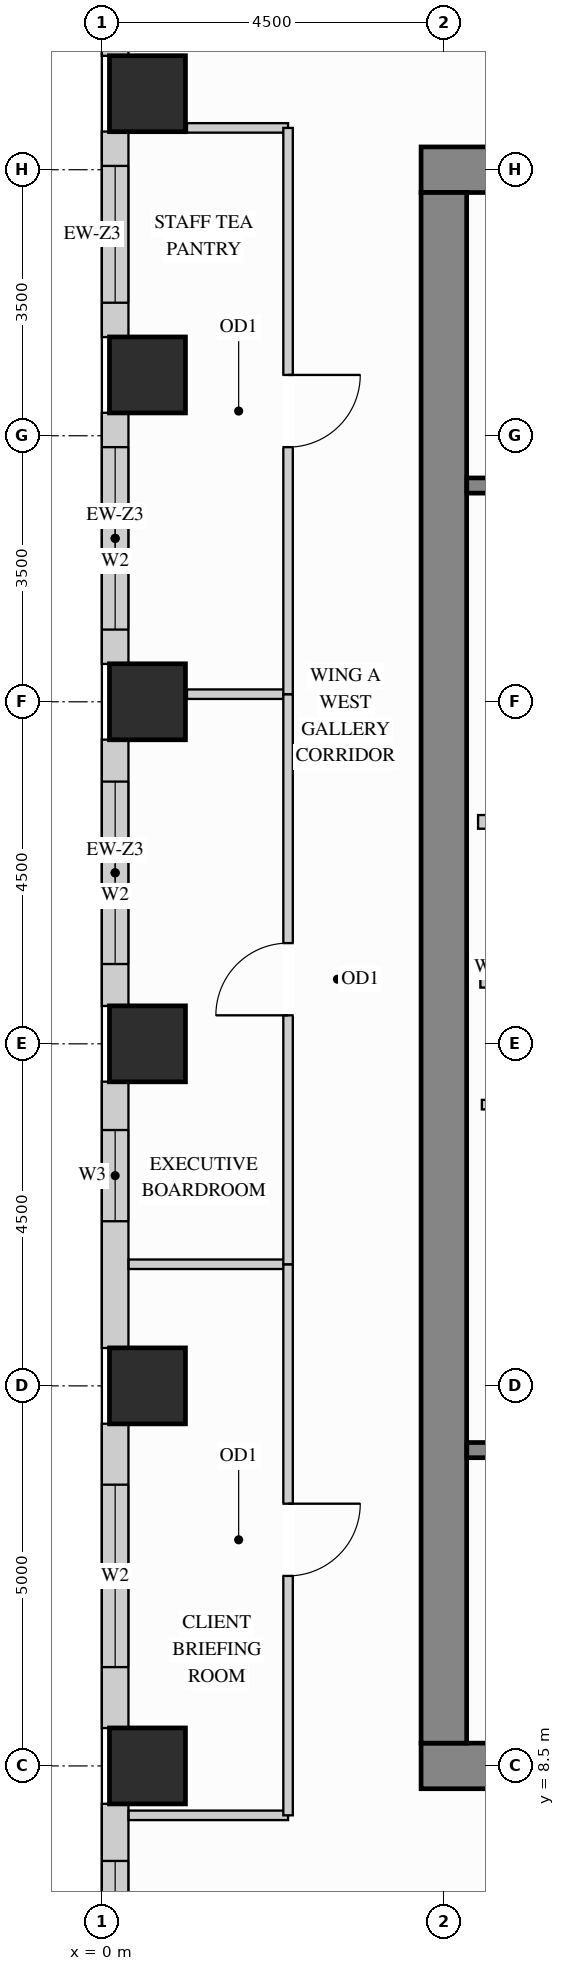
"""IFC4 building model, lengths in metres.
Left out: names, types, materials, properties, quantities, classifications, styles, units other than length and angle.
Written with IfcOpenShell. Run it as: python <this file> out.ifc"""

import sys

from ifc_helpers import new_model, si_unit, direction, frame, frame_2d, origin, origin_2d, place, context, subcontext, project, spatial, rectangle, extrude, source, transform, mapped, element, fill, save


model = new_model("IFC4")
c1 = context("Model", 3, precision=1e-05, world=origin(), true_north=direction((0.0, 1.0)))
c2 = subcontext(c1, "Body", "Model", "MODEL_VIEW")
j1 = project(units=[si_unit("LENGTHUNIT", "METRE"), si_unit("PLANEANGLEUNIT", "RADIAN")], contexts=[c1])
p1 = place(None, origin())
s1 = spatial("IfcSite", under=j1, at=p1, CompositionType="ELEMENT")
p2 = place(p1, origin())
s2 = spatial("IfcBuilding", under=s1, at=p2, CompositionType="ELEMENT")
p3 = place(p2, frame((0.0, 0.0, 197.1)))
s3 = spatial("IfcBuildingStorey", under=s2, at=p3, CompositionType="ELEMENT", Elevation=197.1)
m1 = source(origin(), c2, "Body", "SweptSolid", [
    extrude(rectangle(XDim=1.0, YDim=1.0, at=origin_2d()), origin(), (0.0, 0.0, 1.0), 3.4),
])
for number, where, z_axis, x_axis in (
    (1, (0.6, 13.5, 0.0), (0.0, 0.0, 1.0), (1.0, 0.0, 0.0)),
    (2, (0.6, 18.0, 0.0), (0.0, 0.0, 1.0), (1.0, 0.0, 0.0)),
    (3, (0.6, 22.5, 0.0), (0.0, 0.0, 1.0), (1.0, 0.0, 0.0)),
    (4, (0.6, 26.8, 0.0), (0.0, 0.0, 1.0), (1.0, 0.0, 0.0)),
    (5, (0.6, 30.5, 0.0), (0.0, 0.0, 1.0), (1.0, 0.0, 0.0)),
    (6, (0.6, 8.5, 0.0), (0.0, 0.0, 1.0), (1.0, 0.0, 0.0)),
):
    element("IfcColumn", number, at=place(p3, frame(where, z_axis=z_axis, x_axis=x_axis)), inside=s3, PredefinedType="COLUMN", context=c2, shape_type="MappedRepresentation", body=[
        mapped(m1, transform((0.0, 0.0, 0.0), x_axis=(1.0, 0.0, 0.0), y_axis=(0.0, 1.0, 0.0), z_axis=(0.0, 0.0, 1.0))),
    ])
m2 = source(origin(), c2, "Body", "SweptSolid", [
    extrude(rectangle(XDim=10.6, YDim=0.6, at=frame_2d((5.3, 0.0))), origin(), (0.0, 0.0, 1.0), 3.4),
])
for number, where, z_axis, x_axis in (
    (7, (4.2, 29.5, 0.0), (0.0, 0.0, 1.0), (1.0, 0.0, 0.0)),
    (8, (4.2, 8.5, 0.0), (0.0, 0.0, 1.0), (1.0, 0.0, 0.0)),
):
    element("IfcWall", number, at=place(p3, frame(where, z_axis=z_axis, x_axis=x_axis)), inside=s3, PredefinedType="SHEAR", context=c2, shape_type="MappedRepresentation", body=[
        mapped(m2, transform((0.0, 0.0, 0.0), x_axis=(1.0, 0.0, 0.0), y_axis=(0.0, 1.0, 0.0), z_axis=(0.0, 0.0, 1.0))),
    ])
m3 = source(origin(), c2, "Body", "SweptSolid", [
    extrude(rectangle(XDim=20.4, YDim=0.6, at=frame_2d((10.2, 0.0))), origin(), (0.0, 0.0, 1.0), 3.4),
])
p4 = place(p3, frame((4.5, 8.8, 0.0), z_axis=(0.0, 0.0, 1.0), x_axis=(0.0, 1.0, 0.0)))
e9 = element("IfcWall", 9, at=p4, inside=s3, PredefinedType="SHEAR", context=c2, shape_type="MappedRepresentation", body=[
    mapped(m3, transform((0.0, 0.0, 0.0), x_axis=(1.0, 0.0, 0.0), y_axis=(0.0, 1.0, 0.0), z_axis=(0.0, 0.0, 1.0))),
])
p5 = place(p3, frame((0.175, 34.502, 0.0), z_axis=(0.0, 0.0, 1.0), x_axis=(0.0, -1.0, 0.0)))
e10 = element("IfcWall", 10, at=p5, inside=s3, PredefinedType="SOLIDWALL", context=c2, shape_type="SweptSolid", body=[
    extrude(rectangle(XDim=3.504, YDim=0.35, at=frame_2d((1.752, 0.0))), origin(), (0.0, 0.0, 1.0), 2.612),
])
p6 = place(p5, frame((0.511, 0.0, 0.78)))
e11 = element("IfcOpeningElement", 11, at=p6, cuts=e10, PredefinedType="OPENING", context=c2, shape_type="SweptSolid", body=[
    extrude(rectangle(XDim=1.2, YDim=1.652, at=frame_2d((0.6, 0.826))), frame((0.0, 0.185, 0.0), z_axis=(0.0, -1.0, 0.0), x_axis=(1.0, 0.0, 0.0)), (0.0, 0.0, 1.0), 0.37),
])
p7 = place(p3, frame((0.175, 30.002, 0.0), z_axis=(0.0, 0.0, 1.0), x_axis=(0.0, -1.0, 0.0)))
e12 = element("IfcWall", 12, at=p7, inside=s3, PredefinedType="SOLIDWALL", context=c2, shape_type="SweptSolid", body=[
    extrude(rectangle(XDim=2.704, YDim=0.35, at=frame_2d((1.352, 0.0))), origin(), (0.0, 0.0, 1.0), 2.612),
])
p8 = place(p7, frame((0.452, 0.0, 0.78)))
e13 = element("IfcOpeningElement", 13, at=p8, cuts=e12, PredefinedType="OPENING", context=c2, shape_type="SweptSolid", body=[
    extrude(rectangle(XDim=1.8, YDim=1.652, at=frame_2d((0.9, 0.826))), frame((0.0, 0.185, 0.0), z_axis=(0.0, -1.0, 0.0), x_axis=(1.0, 0.0, 0.0)), (0.0, 0.0, 1.0), 0.37),
])
p9 = place(p3, frame((0.175, 26.302, 0.0), z_axis=(0.0, 0.0, 1.0), x_axis=(0.0, -1.0, 0.0)))
e14 = element("IfcWall", 14, at=p9, inside=s3, PredefinedType="SOLIDWALL", context=c2, shape_type="SweptSolid", body=[
    extrude(rectangle(XDim=3.304, YDim=0.35, at=frame_2d((1.652, 0.0))), origin(), (0.0, 0.0, 1.0), 2.612),
])
p10 = place(p9, frame((0.452, 0.0, 0.78)))
e15 = element("IfcOpeningElement", 15, at=p10, cuts=e14, PredefinedType="OPENING", context=c2, shape_type="SweptSolid", body=[
    extrude(rectangle(XDim=2.4, YDim=1.652, at=frame_2d((1.2, 0.826))), frame((0.0, 0.185, 0.0), z_axis=(0.0, -1.0, 0.0), x_axis=(1.0, 0.0, 0.0)), (0.0, 0.0, 1.0), 0.37),
])
p11 = place(p3, frame((0.175, 22.002, 0.0), z_axis=(0.0, 0.0, 1.0), x_axis=(0.0, -1.0, 0.0)))
e16 = element("IfcWall", 16, at=p11, inside=s3, PredefinedType="SOLIDWALL", context=c2, shape_type="SweptSolid", body=[
    extrude(rectangle(XDim=3.504, YDim=0.35, at=frame_2d((1.752, 0.0))), origin(), (0.0, 0.0, 1.0), 2.612),
])
p12 = place(p11, frame((0.552, 0.0, 0.78)))
e17 = element("IfcOpeningElement", 17, at=p12, cuts=e16, PredefinedType="OPENING", context=c2, shape_type="SweptSolid", body=[
    extrude(rectangle(XDim=2.4, YDim=1.652, at=frame_2d((1.2, 0.826))), frame((0.0, 0.185, 0.0), z_axis=(0.0, -1.0, 0.0), x_axis=(1.0, 0.0, 0.0)), (0.0, 0.0, 1.0), 0.37),
])
p13 = place(p3, frame((0.175, 17.502, 0.0), z_axis=(0.0, 0.0, 1.0), x_axis=(0.0, -1.0, 0.0)))
e18 = element("IfcWall", 18, at=p13, inside=s3, PredefinedType="SOLIDWALL", context=c2, shape_type="SweptSolid", body=[
    extrude(rectangle(XDim=3.504, YDim=0.35, at=frame_2d((1.752, 0.0))), origin(), (0.0, 0.0, 1.0), 2.612),
])
p14 = place(p13, frame((0.636, 0.0, 0.78)))
e19 = element("IfcOpeningElement", 19, at=p14, cuts=e18, PredefinedType="OPENING", context=c2, shape_type="SweptSolid", body=[
    extrude(rectangle(XDim=1.2, YDim=1.652, at=frame_2d((0.6, 0.826))), frame((0.0, 0.185, 0.0), z_axis=(0.0, -1.0, 0.0), x_axis=(1.0, 0.0, 0.0)), (0.0, 0.0, 1.0), 0.37),
])
p15 = place(p3, frame((0.175, 13.002, 0.0), z_axis=(0.0, 0.0, 1.0), x_axis=(0.0, -1.0, 0.0)))
e20 = element("IfcWall", 20, at=p15, inside=s3, PredefinedType="SOLIDWALL", context=c2, shape_type="SweptSolid", body=[
    extrude(rectangle(XDim=4.004, YDim=0.35, at=frame_2d((2.002, 0.0))), origin(), (0.0, 0.0, 1.0), 2.612),
])
p16 = place(p15, frame((0.802, 0.0, 0.78)))
e21 = element("IfcOpeningElement", 21, at=p16, cuts=e20, PredefinedType="OPENING", context=c2, shape_type="SweptSolid", body=[
    extrude(rectangle(XDim=2.4, YDim=1.652, at=frame_2d((1.2, 0.826))), frame((0.0, 0.185, 0.0), z_axis=(0.0, -1.0, 0.0), x_axis=(1.0, 0.0, 0.0)), (0.0, 0.0, 1.0), 0.37),
])
p17 = place(p3, frame((0.175, 8.002, 0.0), z_axis=(0.0, 0.0, 1.0), x_axis=(0.0, -1.0, 0.0)))
e22 = element("IfcWall", 22, at=p17, inside=s3, PredefinedType="SOLIDWALL", context=c2, shape_type="SweptSolid", body=[
    extrude(rectangle(XDim=4.004, YDim=0.35, at=frame_2d((2.002, 0.0))), origin(), (0.0, 0.0, 1.0), 2.612),
])
p18 = place(p17, frame((0.752, 0.0, 0.78)))
e23 = element("IfcOpeningElement", 23, at=p18, cuts=e22, PredefinedType="OPENING", context=c2, shape_type="SweptSolid", body=[
    extrude(rectangle(XDim=1.2, YDim=1.652, at=frame_2d((0.6, 0.826))), frame((0.0, 0.185, 0.0), z_axis=(0.0, -1.0, 0.0), x_axis=(1.0, 0.0, 0.0)), (0.0, 0.0, 1.0), 0.37),
])
m4 = source(origin(), c2, "Body", "SweptSolid", [
    extrude(rectangle(XDim=2.2, YDim=0.18, at=frame_2d((1.1, 0.0))), origin(), (0.0, 0.0, 1.0), 3.385),
])
p19 = place(p3, frame((4.95, 20.92, 0.0), z_axis=(0.0, 0.0, 1.0), x_axis=(1.0, 0.0, 0.0)))
e24 = element("IfcWall", 24, at=p19, inside=s3, PredefinedType="PARTITIONING", context=c2, shape_type="MappedRepresentation", body=[
    mapped(m4, transform((0.0, 0.0, 0.0), x_axis=(1.0, 0.0, 0.0), y_axis=(0.0, 1.0, 0.0), z_axis=(0.0, 0.0, 1.0))),
])
p20 = place(p3, frame((5.0, 17.2, 0.0), z_axis=(0.0, 0.0, 1.0), x_axis=(1.0, 0.0, 0.0)))
e25 = element("IfcWall", 25, at=p20, inside=s3, PredefinedType="PARTITIONING", context=c2, shape_type="SweptSolid", body=[
    extrude(rectangle(XDim=2.4, YDim=0.125, at=frame_2d((1.2, 0.0))), origin(), (0.0, 0.0, 1.0), 3.385),
])
p21 = place(p20, frame((0.7, 0.0, 0.0)))
e26 = element("IfcOpeningElement", 26, at=p21, cuts=e25, PredefinedType="OPENING", context=c2, shape_type="SweptSolid", body=[
    extrude(rectangle(XDim=0.85, YDim=2.1, at=frame_2d((0.425, 1.05))), frame((0.0, 0.073, 0.0), z_axis=(0.0, -1.0, 0.0), x_axis=(1.0, 0.0, 0.0)), (0.0, 0.0, 1.0), 0.145),
])
m5 = source(origin(), c2, "Body", "SweptSolid", [
    extrude(rectangle(XDim=1.33, YDim=0.125, at=frame_2d((0.665, 0.0))), origin(), (0.0, 0.0, 1.0), 3.385),
])
p22 = place(p3, frame((1.12, 30.05, 0.0), z_axis=(0.0, 0.0, 1.0), x_axis=(1.0, 0.0, 0.0)))
e27 = element("IfcWall", 27, at=p22, inside=s3, PredefinedType="PARTITIONING", context=c2, shape_type="MappedRepresentation", body=[
    mapped(m5, transform((0.0, 0.0, 0.0), x_axis=(1.0, 0.0, 0.0), y_axis=(0.0, 1.0, 0.0), z_axis=(0.0, 0.0, 1.0))),
])
m6 = source(origin(), c2, "Body", "SweptSolid", [
    extrude(rectangle(XDim=2.098, YDim=0.125, at=frame_2d((1.049, 0.0))), origin(), (0.0, 0.0, 1.0), 3.385),
])
for number, where, z_axis, x_axis in (
    (28, (0.352, 7.85, 0.0), (0.0, 0.0, 1.0), (1.0, 0.0, 0.0)),
    (29, (0.352, 15.1, 0.0), (0.0, 0.0, 1.0), (1.0, 0.0, 0.0)),
):
    element("IfcWall", number, at=place(p3, frame(where, z_axis=z_axis, x_axis=x_axis)), inside=s3, PredefinedType="PARTITIONING", context=c2, shape_type="MappedRepresentation", body=[
        mapped(m6, transform((0.0, 0.0, 0.0), x_axis=(1.0, 0.0, 0.0), y_axis=(0.0, 1.0, 0.0), z_axis=(0.0, 0.0, 1.0))),
    ])
p23 = place(p3, frame((1.12, 22.6, 0.0), z_axis=(0.0, 0.0, 1.0), x_axis=(1.0, 0.0, 0.0)))
e30 = element("IfcWall", 30, at=p23, inside=s3, PredefinedType="PARTITIONING", context=c2, shape_type="MappedRepresentation", body=[
    mapped(m5, transform((0.0, 0.0, 0.0), x_axis=(1.0, 0.0, 0.0), y_axis=(0.0, 1.0, 0.0), z_axis=(0.0, 0.0, 1.0))),
])
p24 = place(p3, frame((2.45, 7.85, 0.0), z_axis=(0.0, 0.0, 1.0), x_axis=(0.0, 1.0, 0.0)))
e31 = element("IfcWall", 31, at=p24, inside=s3, PredefinedType="PARTITIONING", context=c2, shape_type="SweptSolid", body=[
    extrude(rectangle(XDim=7.25, YDim=0.125, at=frame_2d((3.625, 0.0))), origin(), (0.0, 0.0, 1.0), 3.385),
])
p25 = place(p24, frame((3.15, 0.0, 0.0)))
e32 = element("IfcOpeningElement", 32, at=p25, cuts=e31, PredefinedType="OPENING", context=c2, shape_type="SweptSolid", body=[
    extrude(rectangle(XDim=0.95, YDim=2.15, at=frame_2d((0.475, 1.075))), frame((0.0, 0.073, 0.0), z_axis=(0.0, -1.0, 0.0), x_axis=(1.0, 0.0, 0.0)), (0.0, 0.0, 1.0), 0.145),
])
p26 = place(p3, frame((2.45, 15.1, 0.0), z_axis=(0.0, 0.0, 1.0), x_axis=(0.0, 1.0, 0.0)))
e33 = element("IfcWall", 33, at=p26, inside=s3, PredefinedType="PARTITIONING", context=c2, shape_type="SweptSolid", body=[
    extrude(rectangle(XDim=7.5, YDim=0.125, at=frame_2d((3.75, 0.0))), origin(), (0.0, 0.0, 1.0), 3.385),
])
p27 = place(p26, frame((3.275, 0.0, 0.0)))
e34 = element("IfcOpeningElement", 34, at=p27, cuts=e33, PredefinedType="OPENING", context=c2, shape_type="SweptSolid", body=[
    extrude(rectangle(XDim=0.95, YDim=2.15, at=frame_2d((0.475, 1.075))), frame((0.0, 0.073, 0.0), z_axis=(0.0, -1.0, 0.0), x_axis=(1.0, 0.0, 0.0)), (0.0, 0.0, 1.0), 0.145),
])
p28 = place(p3, frame((2.45, 22.6, 0.0), z_axis=(0.0, 0.0, 1.0), x_axis=(0.0, 1.0, 0.0)))
e35 = element("IfcWall", 35, at=p28, inside=s3, PredefinedType="PARTITIONING", context=c2, shape_type="SweptSolid", body=[
    extrude(rectangle(XDim=7.45, YDim=0.125, at=frame_2d((3.725, 0.0))), origin(), (0.0, 0.0, 1.0), 3.385),
])
p29 = place(p28, frame((3.25, 0.0, 0.0)))
e36 = element("IfcOpeningElement", 36, at=p29, cuts=e35, PredefinedType="OPENING", context=c2, shape_type="SweptSolid", body=[
    extrude(rectangle(XDim=0.95, YDim=2.15, at=frame_2d((0.475, 1.075))), frame((0.0, 0.073, 0.0), z_axis=(0.0, -1.0, 0.0), x_axis=(1.0, 0.0, 0.0)), (0.0, 0.0, 1.0), 0.145),
])
m7 = source(origin(), c2, "Body", "SweptSolid", [
    extrude(rectangle(XDim=2.09, YDim=0.2, at=frame_2d((1.045, 0.0))), origin(), (0.0, 0.0, 1.0), 3.385),
])
p30 = place(p3, frame((4.98, 18.84, 0.0), z_axis=(0.0, 0.0, 1.0), x_axis=(1.0, 0.0, 0.0)))
e37 = element("IfcWall", 37, at=p30, inside=s3, PredefinedType="PARTITIONING", context=c2, shape_type="MappedRepresentation", body=[
    mapped(m7, transform((0.0, 0.0, 0.0), x_axis=(1.0, 0.0, 0.0), y_axis=(0.0, 1.0, 0.0), z_axis=(0.0, 0.0, 1.0))),
])
p31 = place(p3, frame((4.802, 12.655, 0.0), z_axis=(0.0, 0.0, 1.0), x_axis=(1.0, 0.0, 0.0)))
e38 = element("IfcWall", 38, at=p31, inside=s3, PredefinedType="SHEAR", context=c2, shape_type="SweptSolid", body=[
    extrude(rectangle(XDim=7.603, YDim=0.2, at=frame_2d((3.802, 0.0))), origin(), (0.0, 0.0, 1.0), 3.4),
])
p32 = place(p31, frame((0.4, 0.0, 0.0)))
e39 = element("IfcOpeningElement", 39, at=p32, cuts=e38, PredefinedType="OPENING", context=c2, shape_type="SweptSolid", body=[
    extrude(rectangle(XDim=1.1, YDim=2.15, at=frame_2d((0.55, 1.075))), frame((0.0, 0.11, 0.0), z_axis=(0.0, -1.0, 0.0), x_axis=(1.0, 0.0, 0.0)), (0.0, 0.0, 1.0), 0.22),
])
p33 = place(p3, frame((4.802, 25.345, 0.0), z_axis=(0.0, 0.0, 1.0), x_axis=(1.0, 0.0, 0.0)))
e40 = element("IfcWall", 40, at=p33, inside=s3, PredefinedType="SHEAR", context=c2, shape_type="SweptSolid", body=[
    extrude(rectangle(XDim=7.603, YDim=0.2, at=frame_2d((3.802, 0.0))), origin(), (0.0, 0.0, 1.0), 3.4),
])
p34 = place(p33, frame((0.4, 0.0, 0.0)))
e41 = element("IfcOpeningElement", 41, at=p34, cuts=e40, PredefinedType="OPENING", context=c2, shape_type="SweptSolid", body=[
    extrude(rectangle(XDim=1.1, YDim=2.15, at=frame_2d((0.55, 1.075))), frame((0.0, 0.11, 0.0), z_axis=(0.0, -1.0, 0.0), x_axis=(1.0, 0.0, 0.0)), (0.0, 0.0, 1.0), 0.22),
])
m8 = source(origin(), c2, "Body", "SweptSolid", [
    extrude(rectangle(XDim=0.95, YDim=2.15, at=frame_2d((0.475, 1.075))), frame((0.0, 0.025, 0.0), z_axis=(0.0, -1.0, 0.0), x_axis=(1.0, 0.0, 0.0)), (0.0, 0.0, 1.0), 0.05),
])
p35 = place(p25, origin())
e42 = element("IfcDoor", 42, at=p35, inside=s3, OperationType="SINGLE_SWING_RIGHT", PredefinedType="DOOR", context=c2, shape_type="MappedRepresentation", body=[
    mapped(m8, transform((0.0, 0.0, 0.0), x_axis=(1.0, 0.0, 0.0), y_axis=(0.0, 1.0, 0.0), z_axis=(0.0, 0.0, 1.0))),
])
fill(e32, e42)
p36 = place(p27, origin())
e43 = element("IfcDoor", 43, at=p36, inside=s3, OperationType="SINGLE_SWING_LEFT", PredefinedType="DOOR", context=c2, shape_type="MappedRepresentation", body=[
    mapped(m8, transform((0.0, 0.0, 0.0), x_axis=(1.0, 0.0, 0.0), y_axis=(0.0, 1.0, 0.0), z_axis=(0.0, 0.0, 1.0))),
])
fill(e34, e43)
p37 = place(p29, origin())
e44 = element("IfcDoor", 44, at=p37, inside=s3, OperationType="SINGLE_SWING_RIGHT", PredefinedType="DOOR", context=c2, shape_type="MappedRepresentation", body=[
    mapped(m8, transform((0.0, 0.0, 0.0), x_axis=(1.0, 0.0, 0.0), y_axis=(0.0, 1.0, 0.0), z_axis=(0.0, 0.0, 1.0))),
])
fill(e36, e44)
m9 = source(origin(), c2, "Body", "SweptSolid", [
    extrude(rectangle(XDim=1.8, YDim=1.652, at=frame_2d((0.9, 0.826))), frame((0.0, 0.03, 0.0), z_axis=(0.0, -1.0, 0.0), x_axis=(1.0, 0.0, 0.0)), (0.0, 0.0, 1.0), 0.06),
])
p38 = place(p8, origin())
e45 = element("IfcWindow", 45, at=p38, inside=s3, PartitioningType="SINGLE_PANEL", PredefinedType="WINDOW", context=c2, shape_type="MappedRepresentation", body=[
    mapped(m9, transform((0.0, 0.0, 0.0), x_axis=(1.0, 0.0, 0.0), y_axis=(0.0, 1.0, 0.0), z_axis=(0.0, 0.0, 1.0))),
])
fill(e13, e45)
m10 = source(origin(), c2, "Body", "SweptSolid", [
    extrude(rectangle(XDim=2.4, YDim=1.652, at=frame_2d((1.2, 0.826))), frame((0.0, 0.03, 0.0), z_axis=(0.0, -1.0, 0.0), x_axis=(1.0, 0.0, 0.0)), (0.0, 0.0, 1.0), 0.06),
])
p39 = place(p10, origin())
e46 = element("IfcWindow", 46, at=p39, inside=s3, PartitioningType="SINGLE_PANEL", PredefinedType="WINDOW", context=c2, shape_type="MappedRepresentation", body=[
    mapped(m10, transform((0.0, 0.0, 0.0), x_axis=(1.0, 0.0, 0.0), y_axis=(0.0, 1.0, 0.0), z_axis=(0.0, 0.0, 1.0))),
])
fill(e15, e46)
p40 = place(p12, origin())
e47 = element("IfcWindow", 47, at=p40, inside=s3, PartitioningType="SINGLE_PANEL", PredefinedType="WINDOW", context=c2, shape_type="MappedRepresentation", body=[
    mapped(m10, transform((0.0, 0.0, 0.0), x_axis=(1.0, 0.0, 0.0), y_axis=(0.0, 1.0, 0.0), z_axis=(0.0, 0.0, 1.0))),
])
fill(e17, e47)
p41 = place(p16, origin())
e48 = element("IfcWindow", 48, at=p41, inside=s3, PartitioningType="SINGLE_PANEL", PredefinedType="WINDOW", context=c2, shape_type="MappedRepresentation", body=[
    mapped(m10, transform((0.0, 0.0, 0.0), x_axis=(1.0, 0.0, 0.0), y_axis=(0.0, 1.0, 0.0), z_axis=(0.0, 0.0, 1.0))),
])
fill(e21, e48)
m11 = source(origin(), c2, "Body", "SweptSolid", [
    extrude(rectangle(XDim=1.2, YDim=1.652, at=frame_2d((0.6, 0.826))), frame((0.0, 0.03, 0.0), z_axis=(0.0, -1.0, 0.0), x_axis=(1.0, 0.0, 0.0)), (0.0, 0.0, 1.0), 0.06),
])
p42 = place(p14, origin())
e49 = element("IfcWindow", 49, at=p42, inside=s3, PartitioningType="SINGLE_PANEL", PredefinedType="WINDOW", context=c2, shape_type="MappedRepresentation", body=[
    mapped(m11, transform((0.0, 0.0, 0.0), x_axis=(1.0, 0.0, 0.0), y_axis=(0.0, 1.0, 0.0), z_axis=(0.0, 0.0, 1.0))),
])
fill(e19, e49)
p43 = place(p18, origin())
e50 = element("IfcWindow", 50, at=p43, inside=s3, PartitioningType="SINGLE_PANEL", PredefinedType="WINDOW", context=c2, shape_type="MappedRepresentation", body=[
    mapped(m11, transform((0.0, 0.0, 0.0), x_axis=(1.0, 0.0, 0.0), y_axis=(0.0, 1.0, 0.0), z_axis=(0.0, 0.0, 1.0))),
])
fill(e23, e50)
save(model, sys.argv[1])
